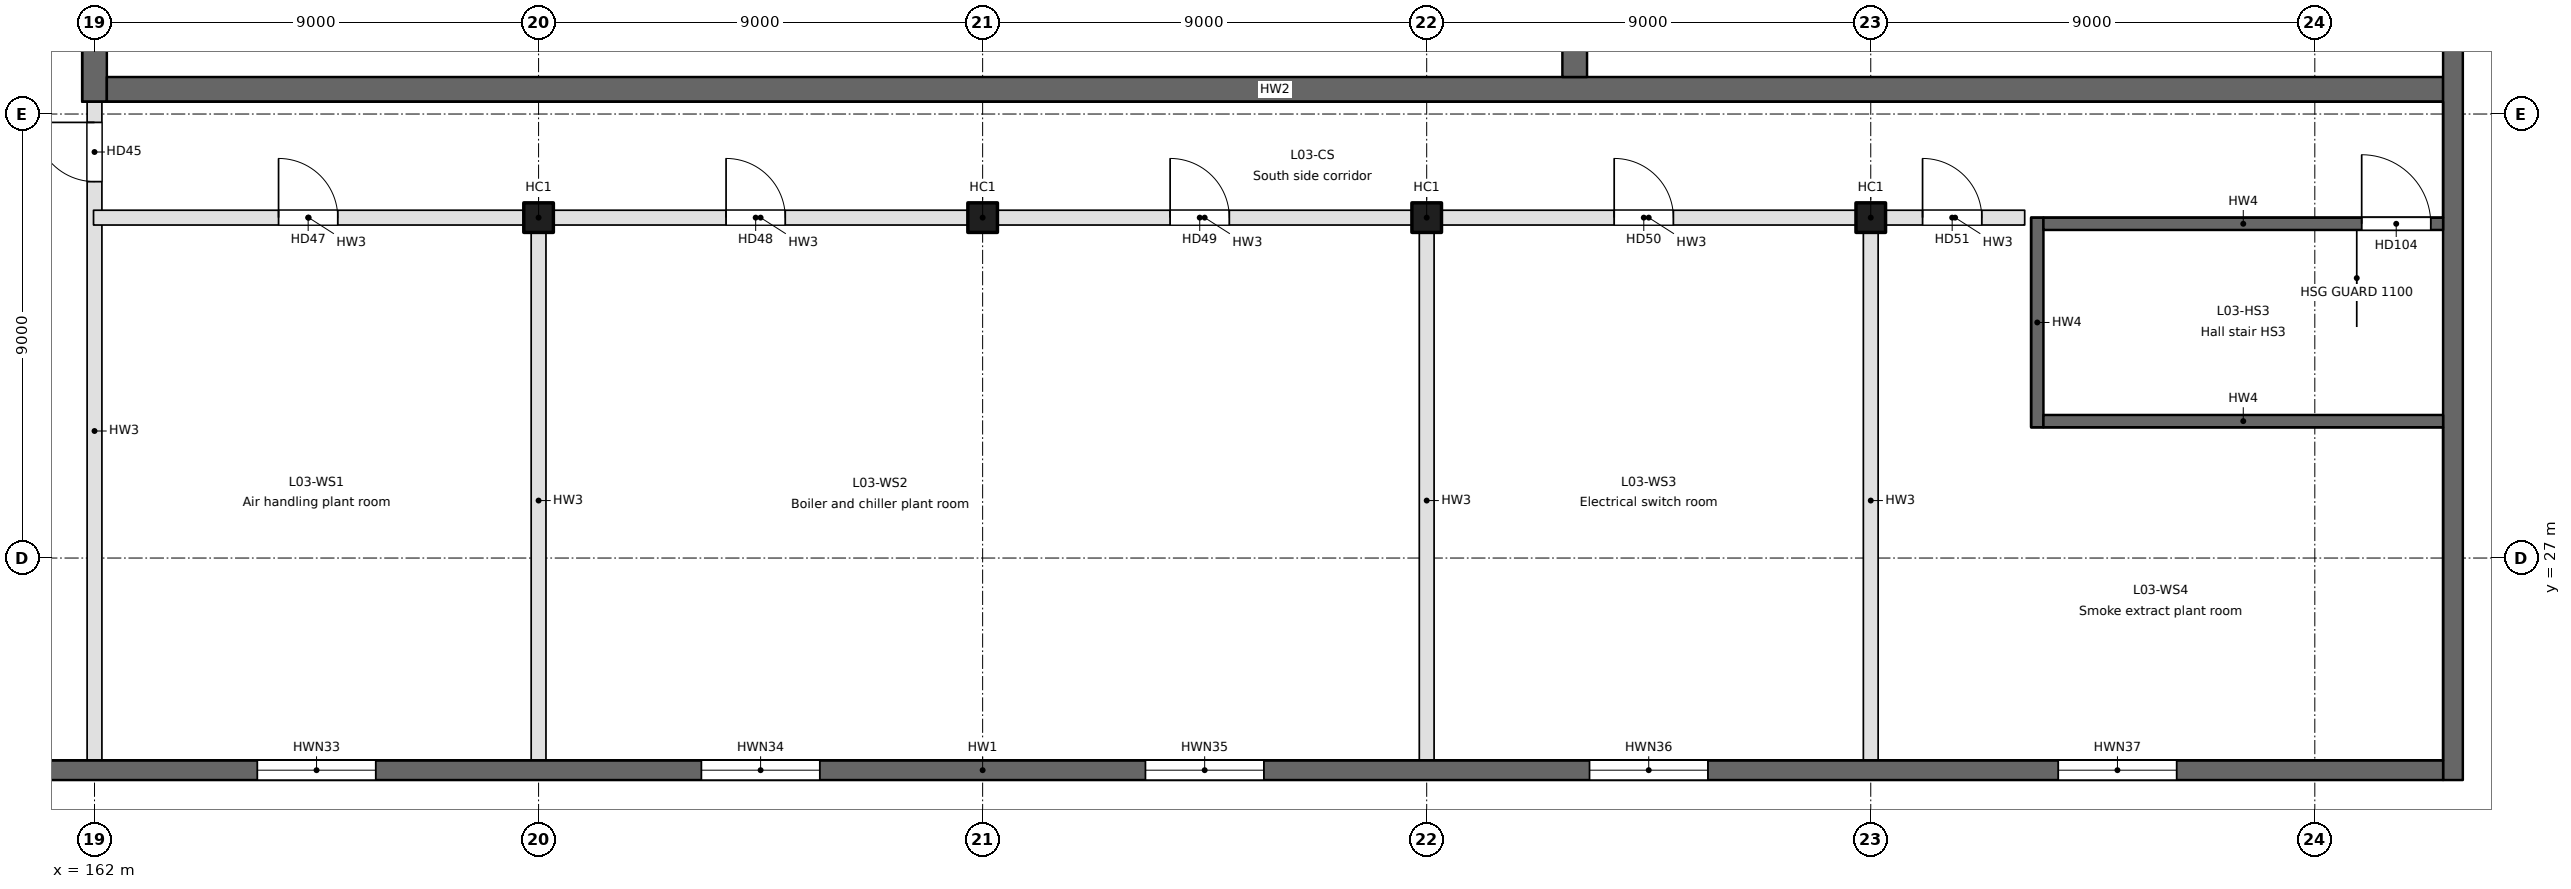
"""IFC4 building model, lengths in metres.
Left out: names, types, materials, properties, quantities, classifications, styles, units other than length and angle.
Written with IfcOpenShell. Run it as: python <this file> out.ifc"""

import sys

from ifc_helpers import new_model, si_unit, direction, frame, frame_2d, origin, origin_2d, place, context, subcontext, project, spatial, rectangle, extrude, element, fill, save


model = new_model("IFC4")
c1 = context("Model", 3, precision=1e-05, world=origin(), true_north=direction((0.0, 1.0)))
c2 = subcontext(c1, "Body", "Model", "MODEL_VIEW")
j1 = project(units=[si_unit("LENGTHUNIT", "METRE"), si_unit("PLANEANGLEUNIT", "RADIAN")], contexts=[c1])
p1 = place(None, origin())
s1 = spatial("IfcSite", under=j1, at=p1, CompositionType="ELEMENT")
p2 = place(p1, origin())
s2 = spatial("IfcBuilding", under=s1, at=p2, CompositionType="ELEMENT")
p3 = place(p2, frame((0.0, 0.0, 16.8)))
s3 = spatial("IfcBuildingStorey", under=s2, at=p3, CompositionType="ELEMENT", Elevation=16.8)
for number, where, z_axis, x_axis in (
    (1, (171.0, 33.9, 0.0), (0.0, 0.0, 1.0), (1.0, 0.0, 0.0)),
    (2, (180.0, 33.9, 0.0), (0.0, 0.0, 1.0), (1.0, 0.0, 0.0)),
    (3, (189.0, 33.9, 0.0), (0.0, 0.0, 1.0), (1.0, 0.0, 0.0)),
    (4, (198.0, 33.9, 0.0), (0.0, 0.0, 1.0), (1.0, 0.0, 0.0)),
):
    element("IfcColumn", number, at=place(p3, frame(where, z_axis=z_axis, x_axis=x_axis)), inside=s3, PredefinedType="COLUMN", context=c2, shape_type="SweptSolid", body=[
        extrude(rectangle(XDim=0.6, YDim=0.6, at=origin_2d()), origin(), (0.0, 0.0, 1.0), 4.8),
    ])
p4 = place(p3, frame((162.0, 36.25, -0.35), z_axis=(0.0, 0.0, 1.0), x_axis=(0.0, 1.0, 0.0)))
e5 = element("IfcWall", 5, at=p4, inside=s3, PredefinedType="SOLIDWALL", context=c2, shape_type="SweptSolid", body=[
    extrude(rectangle(XDim=26.5, YDim=0.5, at=frame_2d((13.25, 0.0))), origin(), (0.0, 0.0, 1.0), 4.8),
])
p5 = place(p3, frame((209.6, 36.5, -0.35), z_axis=(0.0, 0.0, 1.0), x_axis=(-1.0, 0.0, 0.0)))
e6 = element("IfcWall", 6, at=p5, inside=s3, PredefinedType="SOLIDWALL", context=c2, shape_type="SweptSolid", body=[
    extrude(rectangle(XDim=47.35, YDim=0.5, at=frame_2d((23.675, 0.0))), origin(), (0.0, 0.0, 1.0), 4.8),
])
p6 = place(p3, frame((192.0, 36.75, -0.35), z_axis=(0.0, 0.0, 1.0), x_axis=(0.0, 1.0, 0.0)))
e7 = element("IfcWall", 7, at=p6, inside=s3, PredefinedType="SOLIDWALL", context=c2, shape_type="SweptSolid", body=[
    extrude(rectangle(XDim=5.75, YDim=0.5, at=frame_2d((2.875, 0.0))), origin(), (0.0, 0.0, 1.0), 4.8),
])
p7 = place(p3, frame((209.8, 76.5, -0.35), z_axis=(0.0, 0.0, 1.0), x_axis=(0.0, -1.0, 0.0)))
e8 = element("IfcWall", 8, at=p7, inside=s3, PredefinedType="SOLIDWALL", context=c2, shape_type="SweptSolid", body=[
    extrude(rectangle(XDim=54.0, YDim=0.4, at=frame_2d((27.0, 0.0))), origin(), (0.0, 0.0, 1.0), 4.8),
])
p8 = place(p3, frame((209.6, 22.7, -0.35), z_axis=(0.0, 0.0, 1.0), x_axis=(-1.0, 0.0, 0.0)))
e9 = element("IfcWall", 9, at=p8, inside=s3, PredefinedType="SOLIDWALL", context=c2, shape_type="SweptSolid", body=[
    extrude(rectangle(XDim=59.2, YDim=0.4, at=frame_2d((29.6, 0.0))), origin(), (0.0, 0.0, 1.0), 4.8),
])
p9 = place(p8, frame((41.9, 0.0, 1.55)))
e10 = element("IfcOpeningElement", 10, at=p9, cuts=e9, PredefinedType="OPENING", context=c2, shape_type="SweptSolid", body=[
    extrude(rectangle(XDim=2.4, YDim=1.5, at=frame_2d((1.2, 0.75))), frame((0.0, 0.2, 0.0), z_axis=(0.0, -1.0, 0.0), x_axis=(1.0, 0.0, 0.0)), (0.0, 0.0, 1.0), 0.4),
])
p10 = place(p8, frame((32.9, 0.0, 1.55)))
e11 = element("IfcOpeningElement", 11, at=p10, cuts=e9, PredefinedType="OPENING", context=c2, shape_type="SweptSolid", body=[
    extrude(rectangle(XDim=2.4, YDim=1.5, at=frame_2d((1.2, 0.75))), frame((0.0, 0.2, 0.0), z_axis=(0.0, -1.0, 0.0), x_axis=(1.0, 0.0, 0.0)), (0.0, 0.0, 1.0), 0.4),
])
p11 = place(p8, frame((23.9, 0.0, 1.55)))
e12 = element("IfcOpeningElement", 12, at=p11, cuts=e9, PredefinedType="OPENING", context=c2, shape_type="SweptSolid", body=[
    extrude(rectangle(XDim=2.4, YDim=1.5, at=frame_2d((1.2, 0.75))), frame((0.0, 0.2, 0.0), z_axis=(0.0, -1.0, 0.0), x_axis=(1.0, 0.0, 0.0)), (0.0, 0.0, 1.0), 0.4),
])
p12 = place(p8, frame((14.9, 0.0, 1.55)))
e13 = element("IfcOpeningElement", 13, at=p12, cuts=e9, PredefinedType="OPENING", context=c2, shape_type="SweptSolid", body=[
    extrude(rectangle(XDim=2.4, YDim=1.5, at=frame_2d((1.2, 0.75))), frame((0.0, 0.2, 0.0), z_axis=(0.0, -1.0, 0.0), x_axis=(1.0, 0.0, 0.0)), (0.0, 0.0, 1.0), 0.4),
])
p13 = place(p8, frame((5.4, 0.0, 1.55)))
e14 = element("IfcOpeningElement", 14, at=p13, cuts=e9, PredefinedType="OPENING", context=c2, shape_type="SweptSolid", body=[
    extrude(rectangle(XDim=2.4, YDim=1.5, at=frame_2d((1.2, 0.75))), frame((0.0, 0.2, 0.0), z_axis=(0.0, -1.0, 0.0), x_axis=(1.0, 0.0, 0.0)), (0.0, 0.0, 1.0), 0.4),
])
p14 = place(p3, frame((162.0, 22.73, 0.0), z_axis=(0.0, 0.0, 1.0), x_axis=(0.0, 1.0, 0.0)))
e15 = element("IfcWall", 15, at=p14, inside=s3, PredefinedType="PARTITIONING", context=c2, shape_type="SweptSolid", body=[
    extrude(rectangle(XDim=13.69, YDim=0.3, at=frame_2d((6.845, 0.0))), origin(), (0.0, 0.0, 1.0), 4.45),
])
p15 = place(p14, frame((11.9, 0.0, 0.0)))
e16 = element("IfcOpeningElement", 16, at=p15, cuts=e15, PredefinedType="OPENING", context=c2, shape_type="SweptSolid", body=[
    extrude(rectangle(XDim=1.2, YDim=2.1, at=frame_2d((0.6, 1.05))), frame((0.0, 0.15, 0.0), z_axis=(0.0, -1.0, 0.0), x_axis=(1.0, 0.0, 0.0)), (0.0, 0.0, 1.0), 0.3),
])
p16 = place(p3, frame((171.0, 22.73, 0.0), z_axis=(0.0, 0.0, 1.0), x_axis=(0.0, 1.0, 0.0)))
e17 = element("IfcWall", 17, at=p16, inside=s3, PredefinedType="PARTITIONING", context=c2, shape_type="SweptSolid", body=[
    extrude(rectangle(XDim=10.87, YDim=0.3, at=frame_2d((5.435, 0.0))), origin(), (0.0, 0.0, 1.0), 4.45),
])
p17 = place(p3, frame((161.98, 33.9, 0.0), z_axis=(0.0, 0.0, 1.0), x_axis=(1.0, 0.0, 0.0)))
e18 = element("IfcWall", 18, at=p17, inside=s3, PredefinedType="PARTITIONING", context=c2, shape_type="SweptSolid", body=[
    extrude(rectangle(XDim=8.72, YDim=0.3, at=frame_2d((4.36, 0.0))), origin(), (0.0, 0.0, 1.0), 4.45),
])
p18 = place(p17, frame((3.75, 0.0, 0.0)))
e19 = element("IfcOpeningElement", 19, at=p18, cuts=e18, PredefinedType="OPENING", context=c2, shape_type="SweptSolid", body=[
    extrude(rectangle(XDim=1.2, YDim=2.1, at=frame_2d((0.6, 1.05))), frame((0.0, 0.15, 0.0), z_axis=(0.0, -1.0, 0.0), x_axis=(1.0, 0.0, 0.0)), (0.0, 0.0, 1.0), 0.3),
])
p19 = place(p3, frame((171.3, 33.9, 0.0), z_axis=(0.0, 0.0, 1.0), x_axis=(1.0, 0.0, 0.0)))
e20 = element("IfcWall", 20, at=p19, inside=s3, PredefinedType="PARTITIONING", context=c2, shape_type="SweptSolid", body=[
    extrude(rectangle(XDim=8.4, YDim=0.3, at=frame_2d((4.2, 0.0))), origin(), (0.0, 0.0, 1.0), 4.45),
])
p20 = place(p19, frame((3.5, 0.0, 0.0)))
e21 = element("IfcOpeningElement", 21, at=p20, cuts=e20, PredefinedType="OPENING", context=c2, shape_type="SweptSolid", body=[
    extrude(rectangle(XDim=1.2, YDim=2.1, at=frame_2d((0.6, 1.05))), frame((0.0, 0.15, 0.0), z_axis=(0.0, -1.0, 0.0), x_axis=(1.0, 0.0, 0.0)), (0.0, 0.0, 1.0), 0.3),
])
p21 = place(p3, frame((180.3, 33.9, 0.0), z_axis=(0.0, 0.0, 1.0), x_axis=(1.0, 0.0, 0.0)))
e22 = element("IfcWall", 22, at=p21, inside=s3, PredefinedType="PARTITIONING", context=c2, shape_type="SweptSolid", body=[
    extrude(rectangle(XDim=8.4, YDim=0.3, at=frame_2d((4.2, 0.0))), origin(), (0.0, 0.0, 1.0), 4.45),
])
p22 = place(p21, frame((3.5, 0.0, 0.0)))
e23 = element("IfcOpeningElement", 23, at=p22, cuts=e22, PredefinedType="OPENING", context=c2, shape_type="SweptSolid", body=[
    extrude(rectangle(XDim=1.2, YDim=2.1, at=frame_2d((0.6, 1.05))), frame((0.0, 0.15, 0.0), z_axis=(0.0, -1.0, 0.0), x_axis=(1.0, 0.0, 0.0)), (0.0, 0.0, 1.0), 0.3),
])
p23 = place(p3, frame((189.3, 33.9, 0.0), z_axis=(0.0, 0.0, 1.0), x_axis=(1.0, 0.0, 0.0)))
e24 = element("IfcWall", 24, at=p23, inside=s3, PredefinedType="PARTITIONING", context=c2, shape_type="SweptSolid", body=[
    extrude(rectangle(XDim=8.4, YDim=0.3, at=frame_2d((4.2, 0.0))), origin(), (0.0, 0.0, 1.0), 4.45),
])
p24 = place(p23, frame((3.5, 0.0, 0.0)))
e25 = element("IfcOpeningElement", 25, at=p24, cuts=e24, PredefinedType="OPENING", context=c2, shape_type="SweptSolid", body=[
    extrude(rectangle(XDim=1.2, YDim=2.1, at=frame_2d((0.6, 1.05))), frame((0.0, 0.15, 0.0), z_axis=(0.0, -1.0, 0.0), x_axis=(1.0, 0.0, 0.0)), (0.0, 0.0, 1.0), 0.3),
])
p25 = place(p3, frame((198.3, 33.9, 0.0), z_axis=(0.0, 0.0, 1.0), x_axis=(1.0, 0.0, 0.0)))
e26 = element("IfcWall", 26, at=p25, inside=s3, PredefinedType="PARTITIONING", context=c2, shape_type="SweptSolid", body=[
    extrude(rectangle(XDim=2.82, YDim=0.3, at=frame_2d((1.41, 0.0))), origin(), (0.0, 0.0, 1.0), 4.45),
])
p26 = place(p25, frame((0.75, 0.0, 0.0)))
e27 = element("IfcOpeningElement", 27, at=p26, cuts=e26, PredefinedType="OPENING", context=c2, shape_type="SweptSolid", body=[
    extrude(rectangle(XDim=1.2, YDim=2.1, at=frame_2d((0.6, 1.05))), frame((0.0, 0.15, 0.0), z_axis=(0.0, -1.0, 0.0), x_axis=(1.0, 0.0, 0.0)), (0.0, 0.0, 1.0), 0.3),
])
for number, where, z_axis, x_axis in (
    (28, (189.0, 22.73, 0.0), (0.0, 0.0, 1.0), (0.0, 1.0, 0.0)),
    (29, (198.0, 22.73, 0.0), (0.0, 0.0, 1.0), (0.0, 1.0, 0.0)),
):
    element("IfcWall", number, at=place(p3, frame(where, z_axis=z_axis, x_axis=x_axis)), inside=s3, PredefinedType="PARTITIONING", context=c2, shape_type="SweptSolid", body=[
        extrude(rectangle(XDim=10.87, YDim=0.3, at=frame_2d((5.435, 0.0))), origin(), (0.0, 0.0, 1.0), 4.45),
    ])
p27 = place(p3, frame((201.375, 29.65, -0.35), z_axis=(0.0, 0.0, 1.0), x_axis=(0.0, 1.0, 0.0)))
e30 = element("IfcWall", 30, at=p27, inside=s3, PredefinedType="SOLIDWALL", context=c2, shape_type="SweptSolid", body=[
    extrude(rectangle(XDim=4.25, YDim=0.25, at=frame_2d((2.125, 0.0))), origin(), (0.0, 0.0, 1.0), 4.8),
])
p28 = place(p3, frame((209.6, 29.775, -0.35), z_axis=(0.0, 0.0, 1.0), x_axis=(-1.0, 0.0, 0.0)))
e31 = element("IfcWall", 31, at=p28, inside=s3, PredefinedType="SOLIDWALL", context=c2, shape_type="SweptSolid", body=[
    extrude(rectangle(XDim=8.1, YDim=0.25, at=frame_2d((4.05, 0.0))), origin(), (0.0, 0.0, 1.0), 4.8),
])
p29 = place(p3, frame((201.5, 33.775, -0.35), z_axis=(0.0, 0.0, 1.0), x_axis=(1.0, 0.0, 0.0)))
e32 = element("IfcWall", 32, at=p29, inside=s3, PredefinedType="SOLIDWALL", context=c2, shape_type="SweptSolid", body=[
    extrude(rectangle(XDim=8.1, YDim=0.25, at=frame_2d((4.05, 0.0))), origin(), (0.0, 0.0, 1.0), 4.8),
])
p30 = place(p29, frame((6.45, 0.0, 0.35)))
e33 = element("IfcOpeningElement", 33, at=p30, cuts=e32, PredefinedType="OPENING", context=c2, shape_type="SweptSolid", body=[
    extrude(rectangle(XDim=1.4, YDim=2.1, at=frame_2d((0.7, 1.05))), frame((0.0, 0.125, 0.0), z_axis=(0.0, -1.0, 0.0), x_axis=(1.0, 0.0, 0.0)), (0.0, 0.0, 1.0), 0.25),
])
p31 = place(p15, origin())
e34 = element("IfcDoor", 34, at=p31, inside=s3, OperationType="SINGLE_SWING_RIGHT", PredefinedType="DOOR", context=c2, shape_type="SweptSolid", body=[
    extrude(rectangle(XDim=1.2, YDim=2.1, at=frame_2d((0.6, 1.05))), frame((0.0, 0.025, 0.0), z_axis=(0.0, -1.0, 0.0), x_axis=(1.0, 0.0, 0.0)), (0.0, 0.0, 1.0), 0.05),
])
fill(e16, e34)
p32 = place(p18, origin())
e35 = element("IfcDoor", 35, at=p32, inside=s3, OperationType="SINGLE_SWING_LEFT", PredefinedType="DOOR", context=c2, shape_type="SweptSolid", body=[
    extrude(rectangle(XDim=1.2, YDim=2.1, at=frame_2d((0.6, 1.05))), frame((0.0, 0.025, 0.0), z_axis=(0.0, -1.0, 0.0), x_axis=(1.0, 0.0, 0.0)), (0.0, 0.0, 1.0), 0.05),
])
fill(e19, e35)
p33 = place(p20, origin())
e36 = element("IfcDoor", 36, at=p33, inside=s3, OperationType="SINGLE_SWING_LEFT", PredefinedType="DOOR", context=c2, shape_type="SweptSolid", body=[
    extrude(rectangle(XDim=1.2, YDim=2.1, at=frame_2d((0.6, 1.05))), frame((0.0, 0.025, 0.0), z_axis=(0.0, -1.0, 0.0), x_axis=(1.0, 0.0, 0.0)), (0.0, 0.0, 1.0), 0.05),
])
fill(e21, e36)
p34 = place(p22, origin())
e37 = element("IfcDoor", 37, at=p34, inside=s3, OperationType="SINGLE_SWING_LEFT", PredefinedType="DOOR", context=c2, shape_type="SweptSolid", body=[
    extrude(rectangle(XDim=1.2, YDim=2.1, at=frame_2d((0.6, 1.05))), frame((0.0, 0.025, 0.0), z_axis=(0.0, -1.0, 0.0), x_axis=(1.0, 0.0, 0.0)), (0.0, 0.0, 1.0), 0.05),
])
fill(e23, e37)
p35 = place(p24, origin())
e38 = element("IfcDoor", 38, at=p35, inside=s3, OperationType="SINGLE_SWING_LEFT", PredefinedType="DOOR", context=c2, shape_type="SweptSolid", body=[
    extrude(rectangle(XDim=1.2, YDim=2.1, at=frame_2d((0.6, 1.05))), frame((0.0, 0.025, 0.0), z_axis=(0.0, -1.0, 0.0), x_axis=(1.0, 0.0, 0.0)), (0.0, 0.0, 1.0), 0.05),
])
fill(e25, e38)
p36 = place(p26, origin())
e39 = element("IfcDoor", 39, at=p36, inside=s3, OperationType="SINGLE_SWING_LEFT", PredefinedType="DOOR", context=c2, shape_type="SweptSolid", body=[
    extrude(rectangle(XDim=1.2, YDim=2.1, at=frame_2d((0.6, 1.05))), frame((0.0, 0.025, 0.0), z_axis=(0.0, -1.0, 0.0), x_axis=(1.0, 0.0, 0.0)), (0.0, 0.0, 1.0), 0.05),
])
fill(e27, e39)
p37 = place(p9, origin())
e40 = element("IfcWindow", 40, at=p37, inside=s3, PartitioningType="SINGLE_PANEL", PredefinedType="WINDOW", context=c2, shape_type="SweptSolid", body=[
    extrude(rectangle(XDim=2.4, YDim=1.5, at=frame_2d((1.2, 0.75))), frame((0.0, 0.03, 0.0), z_axis=(0.0, -1.0, 0.0), x_axis=(1.0, 0.0, 0.0)), (0.0, 0.0, 1.0), 0.06),
])
fill(e10, e40)
p38 = place(p10, origin())
e41 = element("IfcWindow", 41, at=p38, inside=s3, PartitioningType="SINGLE_PANEL", PredefinedType="WINDOW", context=c2, shape_type="SweptSolid", body=[
    extrude(rectangle(XDim=2.4, YDim=1.5, at=frame_2d((1.2, 0.75))), frame((0.0, 0.03, 0.0), z_axis=(0.0, -1.0, 0.0), x_axis=(1.0, 0.0, 0.0)), (0.0, 0.0, 1.0), 0.06),
])
fill(e11, e41)
p39 = place(p11, origin())
e42 = element("IfcWindow", 42, at=p39, inside=s3, PartitioningType="SINGLE_PANEL", PredefinedType="WINDOW", context=c2, shape_type="SweptSolid", body=[
    extrude(rectangle(XDim=2.4, YDim=1.5, at=frame_2d((1.2, 0.75))), frame((0.0, 0.03, 0.0), z_axis=(0.0, -1.0, 0.0), x_axis=(1.0, 0.0, 0.0)), (0.0, 0.0, 1.0), 0.06),
])
fill(e12, e42)
p40 = place(p12, origin())
e43 = element("IfcWindow", 43, at=p40, inside=s3, PartitioningType="SINGLE_PANEL", PredefinedType="WINDOW", context=c2, shape_type="SweptSolid", body=[
    extrude(rectangle(XDim=2.4, YDim=1.5, at=frame_2d((1.2, 0.75))), frame((0.0, 0.03, 0.0), z_axis=(0.0, -1.0, 0.0), x_axis=(1.0, 0.0, 0.0)), (0.0, 0.0, 1.0), 0.06),
])
fill(e13, e43)
p41 = place(p13, origin())
e44 = element("IfcWindow", 44, at=p41, inside=s3, PartitioningType="SINGLE_PANEL", PredefinedType="WINDOW", context=c2, shape_type="SweptSolid", body=[
    extrude(rectangle(XDim=2.4, YDim=1.5, at=frame_2d((1.2, 0.75))), frame((0.0, 0.03, 0.0), z_axis=(0.0, -1.0, 0.0), x_axis=(1.0, 0.0, 0.0)), (0.0, 0.0, 1.0), 0.06),
])
fill(e14, e44)
p42 = place(p30, origin())
e45 = element("IfcDoor", 45, at=p42, inside=s3, OperationType="SINGLE_SWING_LEFT", PredefinedType="DOOR", context=c2, shape_type="SweptSolid", body=[
    extrude(rectangle(XDim=1.4, YDim=2.1, at=frame_2d((0.7, 1.05))), frame((0.0, 0.025, 0.0), z_axis=(0.0, -1.0, 0.0), x_axis=(1.0, 0.0, 0.0)), (0.0, 0.0, 1.0), 0.05),
])
fill(e33, e45)
save(model, sys.argv[1])
